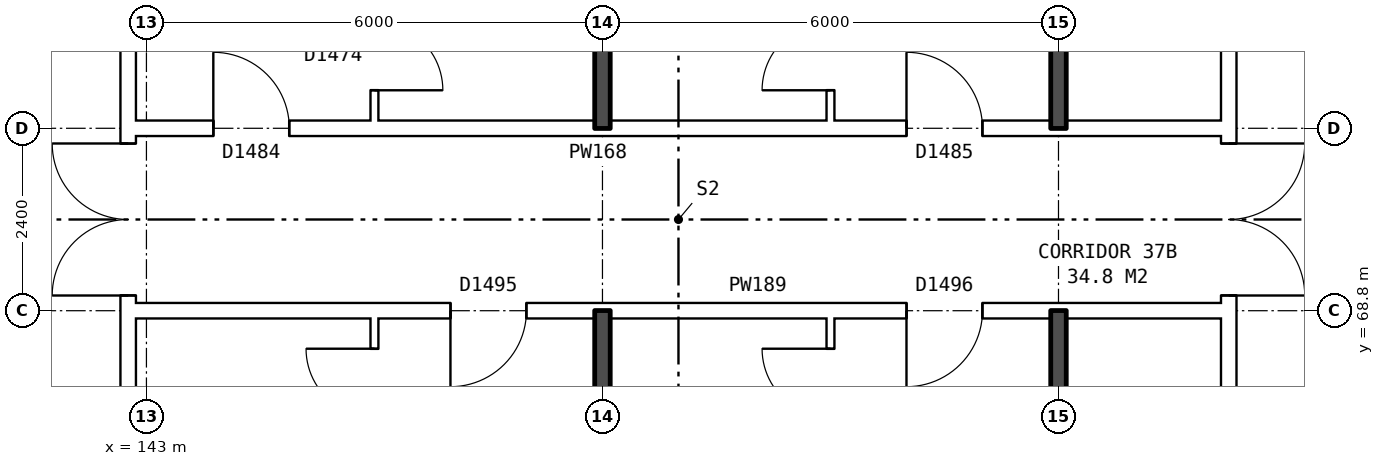
"""IFC4 building model, lengths in metres.
Left out: names, types, materials, properties, quantities, classifications, styles, units other than length and angle.
Written with IfcOpenShell. Run it as: python <this file> out.ifc"""

import sys

from ifc_helpers import new_model, si_unit, direction, frame, frame_2d, origin, place, context, subcontext, project, spatial, rectangle, extrude, element, fill, save


model = new_model("IFC4")
c1 = context("Model", 3, precision=1e-05, world=origin(), true_north=direction((0.0, 1.0)))
c2 = subcontext(c1, "Body", "Model", "MODEL_VIEW")
j1 = project(units=[si_unit("LENGTHUNIT", "METRE"), si_unit("PLANEANGLEUNIT", "RADIAN")], contexts=[c1])
p1 = place(None, origin())
s1 = spatial("IfcSite", under=j1, at=p1, CompositionType="ELEMENT")
p2 = place(p1, origin())
s2 = spatial("IfcBuilding", under=s1, at=p2, CompositionType="ELEMENT")
p3 = place(p2, frame((0.0, 0.0, 133.0)))
s3 = spatial("IfcBuildingStorey", under=s2, at=p3, CompositionType="ELEMENT", Elevation=133.0)
p4 = place(p3, frame((142.76, 63.9, 0.0), z_axis=(0.0, 0.0, 1.0), x_axis=(0.0, 1.0, 0.0)))
e1 = element("IfcWall", 1, at=p4, inside=s3, PredefinedType="PARTITIONING", context=c2, shape_type="SweptSolid", body=[
    extrude(rectangle(XDim=12.2, YDim=0.2, at=frame_2d((6.1, 0.0))), origin(), (0.0, 0.0, 1.0), 2.85),
])
p5 = place(p4, frame((5.1, 0.0, 0.0)))
e2 = element("IfcOpeningElement", 2, at=p5, cuts=e1, PredefinedType="OPENING", context=c2, shape_type="SweptSolid", body=[
    extrude(rectangle(XDim=2.0, YDim=2.1, at=frame_2d((1.0, 1.05))), frame((0.0, 0.11, 0.0), z_axis=(0.0, -1.0, 0.0), x_axis=(1.0, 0.0, 0.0)), (0.0, 0.0, 1.0), 0.22),
])
p6 = place(p3, frame((157.24, 63.9, 0.0), z_axis=(0.0, 0.0, 1.0), x_axis=(0.0, 1.0, 0.0)))
e3 = element("IfcWall", 3, at=p6, inside=s3, PredefinedType="PARTITIONING", context=c2, shape_type="SweptSolid", body=[
    extrude(rectangle(XDim=12.2, YDim=0.2, at=frame_2d((6.1, 0.0))), origin(), (0.0, 0.0, 1.0), 2.85),
])
p7 = place(p6, frame((5.1, 0.0, 0.0)))
e4 = element("IfcOpeningElement", 4, at=p7, cuts=e3, PredefinedType="OPENING", context=c2, shape_type="SweptSolid", body=[
    extrude(rectangle(XDim=2.0, YDim=2.1, at=frame_2d((1.0, 1.05))), frame((0.0, 0.11, 0.0), z_axis=(0.0, -1.0, 0.0), x_axis=(1.0, 0.0, 0.0)), (0.0, 0.0, 1.0), 0.22),
])
p8 = place(p3, frame((142.76, 68.8, 0.0), z_axis=(0.0, 0.0, 1.0), x_axis=(1.0, 0.0, 0.0)))
e5 = element("IfcWall", 5, at=p8, inside=s3, PredefinedType="PARTITIONING", context=c2, shape_type="SweptSolid", body=[
    extrude(rectangle(XDim=14.48, YDim=0.2, at=frame_2d((7.24, 0.0))), origin(), (0.0, 0.0, 1.0), 2.85),
])
p9 = place(p8, frame((4.24, 0.0, 0.0)))
e6 = element("IfcOpeningElement", 6, at=p9, cuts=e5, PredefinedType="OPENING", context=c2, shape_type="SweptSolid", body=[
    extrude(rectangle(XDim=1.0, YDim=2.1, at=frame_2d((0.5, 1.05))), frame((0.0, 0.11, 0.0), z_axis=(0.0, -1.0, 0.0), x_axis=(1.0, 0.0, 0.0)), (0.0, 0.0, 1.0), 0.22),
])
p10 = place(p8, frame((10.24, 0.0, 0.0)))
e7 = element("IfcOpeningElement", 7, at=p10, cuts=e5, PredefinedType="OPENING", context=c2, shape_type="SweptSolid", body=[
    extrude(rectangle(XDim=1.0, YDim=2.1, at=frame_2d((0.5, 1.05))), frame((0.0, 0.11, 0.0), z_axis=(0.0, -1.0, 0.0), x_axis=(1.0, 0.0, 0.0)), (0.0, 0.0, 1.0), 0.22),
])
p11 = place(p3, frame((142.76, 71.2, 0.0), z_axis=(0.0, 0.0, 1.0), x_axis=(1.0, 0.0, 0.0)))
e8 = element("IfcWall", 8, at=p11, inside=s3, PredefinedType="PARTITIONING", context=c2, shape_type="SweptSolid", body=[
    extrude(rectangle(XDim=14.48, YDim=0.2, at=frame_2d((7.24, 0.0))), origin(), (0.0, 0.0, 1.0), 2.85),
])
p12 = place(p11, frame((1.12, 0.0, 0.0)))
e9 = element("IfcOpeningElement", 9, at=p12, cuts=e8, PredefinedType="OPENING", context=c2, shape_type="SweptSolid", body=[
    extrude(rectangle(XDim=1.0, YDim=2.1, at=frame_2d((0.5, 1.05))), frame((0.0, 0.11, 0.0), z_axis=(0.0, -1.0, 0.0), x_axis=(1.0, 0.0, 0.0)), (0.0, 0.0, 1.0), 0.22),
])
p13 = place(p11, frame((10.24, 0.0, 0.0)))
e10 = element("IfcOpeningElement", 10, at=p13, cuts=e8, PredefinedType="OPENING", context=c2, shape_type="SweptSolid", body=[
    extrude(rectangle(XDim=1.0, YDim=2.1, at=frame_2d((0.5, 1.05))), frame((0.0, 0.11, 0.0), z_axis=(0.0, -1.0, 0.0), x_axis=(1.0, 0.0, 0.0)), (0.0, 0.0, 1.0), 0.22),
])
p14 = place(p3, frame((146.0, 54.36, 0.0), z_axis=(0.0, 0.0, 1.0), x_axis=(0.0, 1.0, 0.0)))
e11 = element("IfcWall", 11, at=p14, inside=s3, PredefinedType="PARTITIONING", context=c2, shape_type="SweptSolid", body=[
    extrude(rectangle(XDim=14.34, YDim=0.1, at=frame_2d((7.17, 0.0))), origin(), (0.0, 0.0, 1.0), 2.85),
])
p15 = place(p14, frame((6.7, 0.0, 0.0)))
e12 = element("IfcOpeningElement", 12, at=p15, cuts=e11, PredefinedType="OPENING", context=c2, shape_type="SweptSolid", body=[
    extrude(rectangle(XDim=0.9, YDim=2.1, at=frame_2d((0.45, 1.05))), frame((0.0, 0.06, 0.0), z_axis=(0.0, -1.0, 0.0), x_axis=(1.0, 0.0, 0.0)), (0.0, 0.0, 1.0), 0.12),
])
p16 = place(p14, frame((13.04, 0.0, 0.0)))
e13 = element("IfcOpeningElement", 13, at=p16, cuts=e11, PredefinedType="OPENING", context=c2, shape_type="SweptSolid", body=[
    extrude(rectangle(XDim=0.9, YDim=2.1, at=frame_2d((0.45, 1.05))), frame((0.0, 0.06, 0.0), z_axis=(0.0, -1.0, 0.0), x_axis=(1.0, 0.0, 0.0)), (0.0, 0.0, 1.0), 0.12),
])
p17 = place(p3, frame((146.0, 71.3, 0.0), z_axis=(0.0, 0.0, 1.0), x_axis=(0.0, 1.0, 0.0)))
e14 = element("IfcWall", 14, at=p17, inside=s3, PredefinedType="PARTITIONING", context=c2, shape_type="SweptSolid", body=[
    extrude(rectangle(XDim=14.34, YDim=0.1, at=frame_2d((7.17, 0.0))), origin(), (0.0, 0.0, 1.0), 2.85),
])
p18 = place(p17, frame((6.74, 0.0, 0.0)))
e15 = element("IfcOpeningElement", 15, at=p18, cuts=e14, PredefinedType="OPENING", context=c2, shape_type="SweptSolid", body=[
    extrude(rectangle(XDim=0.9, YDim=2.1, at=frame_2d((0.45, 1.05))), frame((0.0, 0.06, 0.0), z_axis=(0.0, -1.0, 0.0), x_axis=(1.0, 0.0, 0.0)), (0.0, 0.0, 1.0), 0.12),
])
p19 = place(p17, frame((0.4, 0.0, 0.0)))
e16 = element("IfcOpeningElement", 16, at=p19, cuts=e14, PredefinedType="OPENING", context=c2, shape_type="SweptSolid", body=[
    extrude(rectangle(XDim=0.9, YDim=2.1, at=frame_2d((0.45, 1.05))), frame((0.0, 0.06, 0.0), z_axis=(0.0, -1.0, 0.0), x_axis=(1.0, 0.0, 0.0)), (0.0, 0.0, 1.0), 0.12),
])
for number, where, z_axis, x_axis in (
    (17, (149.0, 54.36, 0.0), (0.0, 0.0, 1.0), (0.0, 1.0, 0.0)),
    (18, (149.0, 71.2, 0.0), (0.0, 0.0, 1.0), (0.0, 1.0, 0.0)),
):
    element("IfcWall", number, at=place(p3, frame(where, z_axis=z_axis, x_axis=x_axis)), inside=s3, PredefinedType="SOLIDWALL", context=c2, shape_type="SweptSolid", body=[
        extrude(rectangle(XDim=14.44, YDim=0.2, at=frame_2d((7.22, 0.0))), origin(), (0.0, 0.0, 1.0), 2.85),
    ])
p20 = place(p3, frame((152.0, 54.36, 0.0), z_axis=(0.0, 0.0, 1.0), x_axis=(0.0, 1.0, 0.0)))
e19 = element("IfcWall", 19, at=p20, inside=s3, PredefinedType="PARTITIONING", context=c2, shape_type="SweptSolid", body=[
    extrude(rectangle(XDim=14.34, YDim=0.1, at=frame_2d((7.17, 0.0))), origin(), (0.0, 0.0, 1.0), 2.85),
])
p21 = place(p20, frame((4.2, 0.0, 0.0)))
e20 = element("IfcOpeningElement", 20, at=p21, cuts=e19, PredefinedType="OPENING", context=c2, shape_type="SweptSolid", body=[
    extrude(rectangle(XDim=0.9, YDim=2.1, at=frame_2d((0.45, 1.05))), frame((0.0, 0.06, 0.0), z_axis=(0.0, -1.0, 0.0), x_axis=(1.0, 0.0, 0.0)), (0.0, 0.0, 1.0), 0.12),
])
p22 = place(p20, frame((13.04, 0.0, 0.0)))
e21 = element("IfcOpeningElement", 21, at=p22, cuts=e19, PredefinedType="OPENING", context=c2, shape_type="SweptSolid", body=[
    extrude(rectangle(XDim=0.9, YDim=2.1, at=frame_2d((0.45, 1.05))), frame((0.0, 0.06, 0.0), z_axis=(0.0, -1.0, 0.0), x_axis=(1.0, 0.0, 0.0)), (0.0, 0.0, 1.0), 0.12),
])
p23 = place(p3, frame((152.0, 71.3, 0.0), z_axis=(0.0, 0.0, 1.0), x_axis=(0.0, 1.0, 0.0)))
e22 = element("IfcWall", 22, at=p23, inside=s3, PredefinedType="PARTITIONING", context=c2, shape_type="SweptSolid", body=[
    extrude(rectangle(XDim=14.34, YDim=0.1, at=frame_2d((7.17, 0.0))), origin(), (0.0, 0.0, 1.0), 2.85),
])
p24 = place(p23, frame((7.94, 0.0, 0.0)))
e23 = element("IfcOpeningElement", 23, at=p24, cuts=e22, PredefinedType="OPENING", context=c2, shape_type="SweptSolid", body=[
    extrude(rectangle(XDim=0.9, YDim=2.1, at=frame_2d((0.45, 1.05))), frame((0.0, 0.06, 0.0), z_axis=(0.0, -1.0, 0.0), x_axis=(1.0, 0.0, 0.0)), (0.0, 0.0, 1.0), 0.12),
])
p25 = place(p23, frame((0.4, 0.0, 0.0)))
e24 = element("IfcOpeningElement", 24, at=p25, cuts=e22, PredefinedType="OPENING", context=c2, shape_type="SweptSolid", body=[
    extrude(rectangle(XDim=0.9, YDim=2.1, at=frame_2d((0.45, 1.05))), frame((0.0, 0.06, 0.0), z_axis=(0.0, -1.0, 0.0), x_axis=(1.0, 0.0, 0.0)), (0.0, 0.0, 1.0), 0.12),
])
for number, where, z_axis, x_axis in (
    (25, (155.0, 63.8, 0.0), (0.0, 0.0, 1.0), (0.0, 1.0, 0.0)),
    (26, (155.0, 71.2, 0.0), (0.0, 0.0, 1.0), (0.0, 1.0, 0.0)),
):
    element("IfcWall", number, at=place(p3, frame(where, z_axis=z_axis, x_axis=x_axis)), inside=s3, PredefinedType="SOLIDWALL", context=c2, shape_type="SweptSolid", body=[
        extrude(rectangle(XDim=5.0, YDim=0.2, at=frame_2d((2.5, 0.0))), origin(), (0.0, 0.0, 1.0), 2.85),
    ])
p26 = place(p5, origin())
e27 = element("IfcDoor", 27, at=p26, inside=s3, OperationType="DOUBLE_DOOR_SINGLE_SWING", PredefinedType="DOOR", context=c2, shape_type="SweptSolid", body=[
    extrude(rectangle(XDim=2.0, YDim=2.1, at=frame_2d((1.0, 1.05))), frame((0.0, 0.025, 0.0), z_axis=(0.0, -1.0, 0.0), x_axis=(1.0, 0.0, 0.0)), (0.0, 0.0, 1.0), 0.05),
])
fill(e2, e27)
p27 = place(p7, frame((2.0, 0.0, 0.0), z_axis=(0.0, 0.0, 1.0), x_axis=(-1.0, 0.0, 0.0)))
e28 = element("IfcDoor", 28, at=p27, inside=s3, OperationType="DOUBLE_DOOR_SINGLE_SWING", PredefinedType="DOOR", context=c2, shape_type="SweptSolid", body=[
    extrude(rectangle(XDim=2.0, YDim=2.1, at=frame_2d((1.0, 1.05))), frame((0.0, 0.025, 0.0), z_axis=(0.0, -1.0, 0.0), x_axis=(1.0, 0.0, 0.0)), (0.0, 0.0, 1.0), 0.05),
])
fill(e4, e28)
p28 = place(p9, frame((1.0, 0.0, 0.0), z_axis=(0.0, 0.0, 1.0), x_axis=(-1.0, 0.0, 0.0)))
e29 = element("IfcDoor", 29, at=p28, inside=s3, OperationType="SINGLE_SWING_RIGHT", PredefinedType="DOOR", context=c2, shape_type="SweptSolid", body=[
    extrude(rectangle(XDim=1.0, YDim=2.1, at=frame_2d((0.5, 1.05))), frame((0.0, 0.025, 0.0), z_axis=(0.0, -1.0, 0.0), x_axis=(1.0, 0.0, 0.0)), (0.0, 0.0, 1.0), 0.05),
])
fill(e6, e29)
p29 = place(p16, origin())
e30 = element("IfcDoor", 30, at=p29, inside=s3, OperationType="SINGLE_SWING_RIGHT", PredefinedType="DOOR", context=c2, shape_type="SweptSolid", body=[
    extrude(rectangle(XDim=0.9, YDim=2.1, at=frame_2d((0.45, 1.05))), frame((0.0, 0.025, 0.0), z_axis=(0.0, -1.0, 0.0), x_axis=(1.0, 0.0, 0.0)), (0.0, 0.0, 1.0), 0.05),
])
fill(e13, e30)
p30 = place(p10, frame((1.0, 0.0, 0.0), z_axis=(0.0, 0.0, 1.0), x_axis=(-1.0, 0.0, 0.0)))
e31 = element("IfcDoor", 31, at=p30, inside=s3, OperationType="SINGLE_SWING_RIGHT", PredefinedType="DOOR", context=c2, shape_type="SweptSolid", body=[
    extrude(rectangle(XDim=1.0, YDim=2.1, at=frame_2d((0.5, 1.05))), frame((0.0, 0.025, 0.0), z_axis=(0.0, -1.0, 0.0), x_axis=(1.0, 0.0, 0.0)), (0.0, 0.0, 1.0), 0.05),
])
fill(e7, e31)
p31 = place(p22, origin())
e32 = element("IfcDoor", 32, at=p31, inside=s3, OperationType="SINGLE_SWING_RIGHT", PredefinedType="DOOR", context=c2, shape_type="SweptSolid", body=[
    extrude(rectangle(XDim=0.9, YDim=2.1, at=frame_2d((0.45, 1.05))), frame((0.0, 0.025, 0.0), z_axis=(0.0, -1.0, 0.0), x_axis=(1.0, 0.0, 0.0)), (0.0, 0.0, 1.0), 0.05),
])
fill(e21, e32)
p32 = place(p12, origin())
e33 = element("IfcDoor", 33, at=p32, inside=s3, OperationType="SINGLE_SWING_LEFT", PredefinedType="DOOR", context=c2, shape_type="SweptSolid", body=[
    extrude(rectangle(XDim=1.0, YDim=2.1, at=frame_2d((0.5, 1.05))), frame((0.0, 0.025, 0.0), z_axis=(0.0, -1.0, 0.0), x_axis=(1.0, 0.0, 0.0)), (0.0, 0.0, 1.0), 0.05),
])
fill(e9, e33)
p33 = place(p19, frame((0.9, 0.0, 0.0), z_axis=(0.0, 0.0, 1.0), x_axis=(-1.0, 0.0, 0.0)))
e34 = element("IfcDoor", 34, at=p33, inside=s3, OperationType="SINGLE_SWING_RIGHT", PredefinedType="DOOR", context=c2, shape_type="SweptSolid", body=[
    extrude(rectangle(XDim=0.9, YDim=2.1, at=frame_2d((0.45, 1.05))), frame((0.0, 0.025, 0.0), z_axis=(0.0, -1.0, 0.0), x_axis=(1.0, 0.0, 0.0)), (0.0, 0.0, 1.0), 0.05),
])
fill(e16, e34)
p34 = place(p13, origin())
e35 = element("IfcDoor", 35, at=p34, inside=s3, OperationType="SINGLE_SWING_LEFT", PredefinedType="DOOR", context=c2, shape_type="SweptSolid", body=[
    extrude(rectangle(XDim=1.0, YDim=2.1, at=frame_2d((0.5, 1.05))), frame((0.0, 0.025, 0.0), z_axis=(0.0, -1.0, 0.0), x_axis=(1.0, 0.0, 0.0)), (0.0, 0.0, 1.0), 0.05),
])
fill(e10, e35)
p35 = place(p25, origin())
e36 = element("IfcDoor", 36, at=p35, inside=s3, OperationType="SINGLE_SWING_LEFT", PredefinedType="DOOR", context=c2, shape_type="SweptSolid", body=[
    extrude(rectangle(XDim=0.9, YDim=2.1, at=frame_2d((0.45, 1.05))), frame((0.0, 0.025, 0.0), z_axis=(0.0, -1.0, 0.0), x_axis=(1.0, 0.0, 0.0)), (0.0, 0.0, 1.0), 0.05),
])
fill(e24, e36)
save(model, sys.argv[1])
